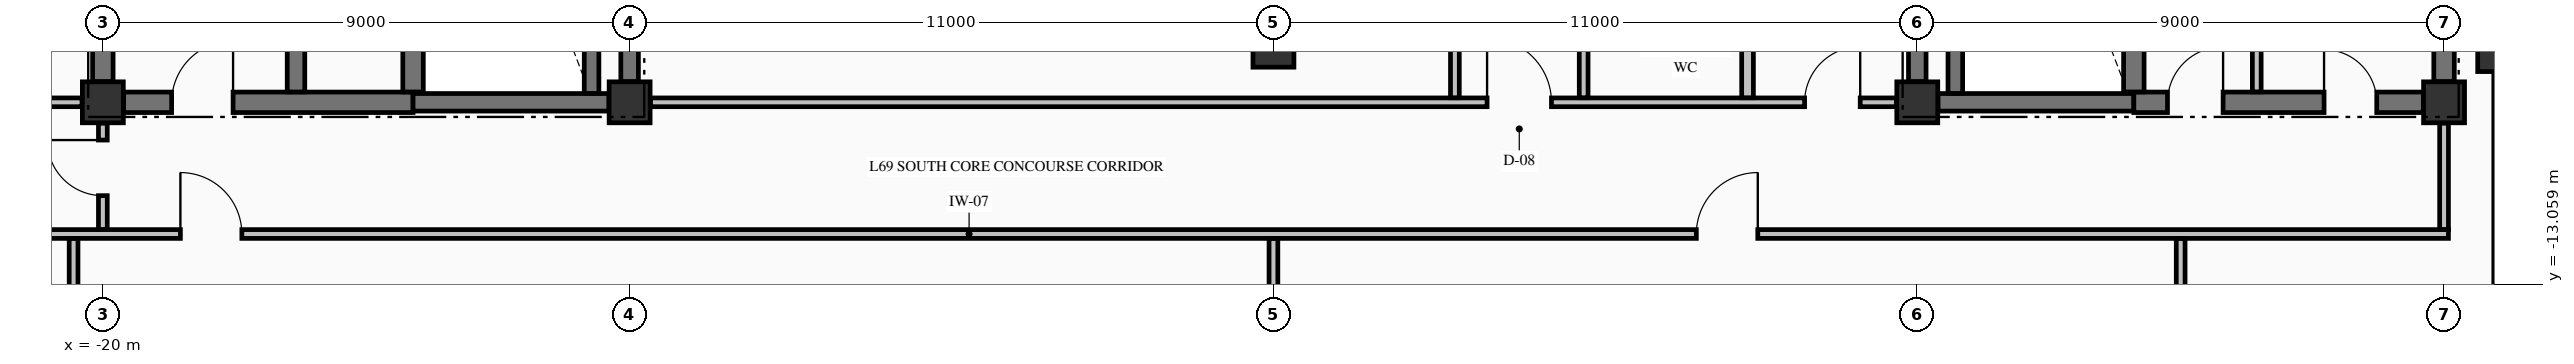
"""IFC4 building model, lengths in metres.
Left out: names, types, materials, properties, quantities, classifications, styles, units other than length and angle.
Written with IfcOpenShell. Run it as: python <this file> out.ifc"""

import sys

from ifc_helpers import new_model, si_unit, direction, frame, frame_2d, origin, origin_2d, place, context, subcontext, project, spatial, rectangle, extrude, element, fill, save


model = new_model("IFC4")
c1 = context("Model", 3, precision=1e-05, world=origin(), true_north=direction((0.0, 1.0)))
c2 = subcontext(c1, "Body", "Model", "MODEL_VIEW")
j1 = project(units=[si_unit("LENGTHUNIT", "METRE"), si_unit("PLANEANGLEUNIT", "RADIAN")], contexts=[c1])
p1 = place(None, origin())
s1 = spatial("IfcSite", under=j1, at=p1, CompositionType="ELEMENT")
p2 = place(p1, origin())
s2 = spatial("IfcBuilding", under=s1, at=p2, CompositionType="ELEMENT")
p3 = place(p2, frame((0.0, 0.0, 260.89)))
s3 = spatial("IfcBuildingStorey", under=s2, at=p3, CompositionType="ELEMENT", Elevation=260.89)
p4 = place(p3, frame((21.0, -9.0, -0.25), z_axis=(0.0, 0.0, 1.0), x_axis=(1.0, 0.0, 0.0)))
e1 = element("IfcColumn", 1, at=p4, inside=s3, PredefinedType="COLUMN", context=c2, shape_type="SweptSolid", body=[
    extrude(rectangle(XDim=0.85, YDim=0.85, at=origin_2d()), origin(), (0.0, 0.0, 1.0), 3.23),
])
for number, where, z_axis, x_axis in (
    (2, (-20.0, -9.95, -0.25), (0.0, 0.0, 1.0), (1.0, 0.0, 0.0)),
    (3, (-11.0, -9.95, -0.25), (0.0, 0.0, 1.0), (1.0, 0.0, 0.0)),
    (4, (11.0, -9.95, -0.25), (0.0, 0.0, 1.0), (1.0, 0.0, 0.0)),
    (5, (20.0, -9.95, -0.25), (0.0, 0.0, 1.0), (1.0, 0.0, 0.0)),
    (6, (0.0, -9.0, -0.25), (0.0, 0.0, 1.0), (1.0, 0.0, 0.0)),
):
    element("IfcColumn", number, at=place(p3, frame(where, z_axis=z_axis, x_axis=x_axis)), inside=s3, PredefinedType="COLUMN", context=c2, shape_type="SweptSolid", body=[
        extrude(rectangle(XDim=0.7, YDim=0.7, at=origin_2d()), origin(), (0.0, 0.0, 1.0), 3.23),
    ])
p5 = place(p3, frame((21.0, -17.545, 0.0), z_axis=(0.0, 0.0, 1.0), x_axis=(0.0, 1.0, 0.0)))
e7 = element("IfcWall", 7, at=p5, inside=s3, PredefinedType="STANDARD", context=c2, shape_type="SweptSolid", body=[
    extrude(rectangle(XDim=8.09, YDim=0.3, at=frame_2d((4.045, 0.0))), origin(), (0.0, 0.0, 1.0), 2.372),
])
p6 = place(p3, frame((-19.646, -9.95, 0.0), z_axis=(0.0, 0.0, 1.0), x_axis=(1.0, 0.0, 0.0)))
e8 = element("IfcWall", 8, at=p6, inside=s3, PredefinedType="SHEAR", context=c2, shape_type="SweptSolid", body=[
    extrude(rectangle(XDim=4.946, YDim=0.35, at=frame_2d((2.473, 0.0))), origin(), (0.0, 0.0, 1.0), 2.98),
])
p7 = place(p6, frame((0.821, 0.0, 0.0)))
e9 = element("IfcOpeningElement", 9, at=p7, cuts=e8, PredefinedType="OPENING", context=c2, shape_type="SweptSolid", body=[
    extrude(rectangle(XDim=1.05, YDim=2.15, at=frame_2d((0.525, 1.075))), frame((0.0, 0.185, 0.0), z_axis=(0.0, -1.0, 0.0), x_axis=(1.0, 0.0, 0.0)), (0.0, 0.0, 1.0), 0.37),
])
for number, where, z_axis, x_axis in (
    (10, (-14.7, -9.95, 0.0), (0.0, 0.0, 1.0), (1.0, 0.0, 0.0)),
    (11, (11.354, -9.95, 0.0), (0.0, 0.0, 1.0), (1.0, 0.0, 0.0)),
):
    element("IfcWall", number, at=place(p3, frame(where, z_axis=z_axis, x_axis=x_axis)), inside=s3, PredefinedType="SHEAR", context=c2, shape_type="SweptSolid", body=[
        extrude(rectangle(XDim=3.346, YDim=0.3, at=frame_2d((1.673, 0.0))), origin(), (0.0, 0.0, 1.0), 2.98),
    ])
p8 = place(p3, frame((14.7, -9.95, 0.0), z_axis=(0.0, 0.0, 1.0), x_axis=(1.0, 0.0, 0.0)))
e12 = element("IfcWall", 12, at=p8, inside=s3, PredefinedType="SHEAR", context=c2, shape_type="SweptSolid", body=[
    extrude(rectangle(XDim=4.946, YDim=0.35, at=frame_2d((2.473, 0.0))), origin(), (0.0, 0.0, 1.0), 2.98),
])
p9 = place(p8, frame((3.25, 0.0, 0.0)))
e13 = element("IfcOpeningElement", 13, at=p9, cuts=e12, PredefinedType="OPENING", context=c2, shape_type="SweptSolid", body=[
    extrude(rectangle(XDim=0.9, YDim=2.15, at=frame_2d((0.45, 1.075))), frame((0.0, 0.185, 0.0), z_axis=(0.0, -1.0, 0.0), x_axis=(1.0, 0.0, 0.0)), (0.0, 0.0, 1.0), 0.37),
])
p10 = place(p8, frame((0.575, 0.0, 0.0)))
e14 = element("IfcOpeningElement", 14, at=p10, cuts=e12, PredefinedType="OPENING", context=c2, shape_type="SweptSolid", body=[
    extrude(rectangle(XDim=0.95, YDim=2.15, at=frame_2d((0.475, 1.075))), frame((0.0, 0.185, 0.0), z_axis=(0.0, -1.0, 0.0), x_axis=(1.0, 0.0, 0.0)), (0.0, 0.0, 1.0), 0.37),
])
p11 = place(p3, frame((-25.835, -12.2, 0.0), z_axis=(0.0, 0.0, 1.0), x_axis=(1.0, 0.0, 0.0)))
e15 = element("IfcWall", 15, at=p11, inside=s3, PredefinedType="PARTITIONING", context=c2, shape_type="SweptSolid", body=[
    extrude(rectangle(XDim=45.91, YDim=0.15, at=frame_2d((22.955, 0.0))), origin(), (0.0, 0.0, 1.0), 2.98),
])
p12 = place(p11, frame((7.16, 0.0, 0.0)))
e16 = element("IfcOpeningElement", 16, at=p12, cuts=e15, PredefinedType="OPENING", context=c2, shape_type="SweptSolid", body=[
    extrude(rectangle(XDim=1.05, YDim=2.15, at=frame_2d((0.525, 1.075))), frame((0.0, 0.085, 0.0), z_axis=(0.0, -1.0, 0.0), x_axis=(1.0, 0.0, 0.0)), (0.0, 0.0, 1.0), 0.17),
])
p13 = place(p11, frame((33.06, 0.0, 0.0)))
e17 = element("IfcOpeningElement", 17, at=p13, cuts=e15, PredefinedType="OPENING", context=c2, shape_type="SweptSolid", body=[
    extrude(rectangle(XDim=1.05, YDim=2.15, at=frame_2d((0.525, 1.075))), frame((0.0, 0.085, 0.0), z_axis=(0.0, -1.0, 0.0), x_axis=(1.0, 0.0, 0.0)), (0.0, 0.0, 1.0), 0.17),
])
p14 = place(p3, frame((-25.835, -9.95, 0.0), z_axis=(0.0, 0.0, 1.0), x_axis=(1.0, 0.0, 0.0)))
e18 = element("IfcWall", 18, at=p14, inside=s3, PredefinedType="PARTITIONING", context=c2, shape_type="SweptSolid", body=[
    extrude(rectangle(XDim=5.479, YDim=0.15, at=frame_2d((2.74, 0.0))), origin(), (0.0, 0.0, 1.0), 2.98),
])
p15 = place(p14, frame((2.335, 0.0, 0.0)))
e19 = element("IfcOpeningElement", 19, at=p15, cuts=e18, PredefinedType="OPENING", context=c2, shape_type="SweptSolid", body=[
    extrude(rectangle(XDim=1.0, YDim=2.15, at=frame_2d((0.5, 1.075))), frame((0.0, 0.085, 0.0), z_axis=(0.0, -1.0, 0.0), x_axis=(1.0, 0.0, 0.0)), (0.0, 0.0, 1.0), 0.17),
])
p16 = place(p3, frame((-10.644, -9.95, 0.0), z_axis=(0.0, 0.0, 1.0), x_axis=(1.0, 0.0, 0.0)))
e20 = element("IfcWall", 20, at=p16, inside=s3, PredefinedType="PARTITIONING", context=c2, shape_type="SweptSolid", body=[
    extrude(rectangle(XDim=21.288, YDim=0.15, at=frame_2d((10.644, 0.0))), origin(), (0.0, 0.0, 1.0), 2.98),
])
p17 = place(p16, frame((14.294, 0.0, 0.0)))
e21 = element("IfcOpeningElement", 21, at=p17, cuts=e20, PredefinedType="OPENING", context=c2, shape_type="SweptSolid", body=[
    extrude(rectangle(XDim=1.1, YDim=2.15, at=frame_2d((0.55, 1.075))), frame((0.0, 0.085, 0.0), z_axis=(0.0, -1.0, 0.0), x_axis=(1.0, 0.0, 0.0)), (0.0, 0.0, 1.0), 0.17),
])
p18 = place(p16, frame((19.719, 0.0, 0.0)))
e22 = element("IfcOpeningElement", 22, at=p18, cuts=e20, PredefinedType="OPENING", context=c2, shape_type="SweptSolid", body=[
    extrude(rectangle(XDim=0.95, YDim=2.15, at=frame_2d((0.475, 1.075))), frame((0.0, 0.085, 0.0), z_axis=(0.0, -1.0, 0.0), x_axis=(1.0, 0.0, 0.0)), (0.0, 0.0, 1.0), 0.17),
])
p19 = place(p3, frame((-20.0, -9.596, 0.0), z_axis=(0.0, 0.0, 1.0), x_axis=(0.0, 1.0, 0.0)))
e23 = element("IfcWall", 23, at=p19, inside=s3, PredefinedType="SHEAR", context=c2, shape_type="SweptSolid", body=[
    extrude(rectangle(XDim=9.242, YDim=0.35, at=frame_2d((4.621, 0.0))), origin(), (0.0, 0.0, 1.0), 2.98),
])
p20 = place(p3, frame((-16.7, -9.773, 0.0), z_axis=(0.0, 0.0, 1.0), x_axis=(0.0, 1.0, 0.0)))
e24 = element("IfcWall", 24, at=p20, inside=s3, PredefinedType="SHEAR", context=c2, shape_type="SweptSolid", body=[
    extrude(rectangle(XDim=9.371, YDim=0.3, at=frame_2d((4.686, 0.0))), origin(), (0.0, 0.0, 1.0), 2.98),
])
p21 = place(p3, frame((-14.7, -9.773, 0.0), z_axis=(0.0, 0.0, 1.0), x_axis=(0.0, 1.0, 0.0)))
e25 = element("IfcWall", 25, at=p21, inside=s3, PredefinedType="SHEAR", context=c2, shape_type="SweptSolid", body=[
    extrude(rectangle(XDim=9.371, YDim=0.35, at=frame_2d((4.686, 0.0))), origin(), (0.0, 0.0, 1.0), 2.98),
])
p22 = place(p3, frame((-11.65, -9.798, 0.0), z_axis=(0.0, 0.0, 1.0), x_axis=(0.0, 1.0, 0.0)))
e26 = element("IfcWall", 26, at=p22, inside=s3, PredefinedType="SOLIDWALL", context=c2, shape_type="SweptSolid", body=[
    extrude(rectangle(XDim=9.396, YDim=0.25, at=frame_2d((4.698, 0.0))), origin(), (0.0, 0.0, 1.0), 2.98),
])
for number, where, z_axis, x_axis in (
    (27, (-11.0, -9.596, 0.0), (0.0, 0.0, 1.0), (0.0, 1.0, 0.0)),
    (28, (11.0, -9.596, 0.0), (0.0, 0.0, 1.0), (0.0, 1.0, 0.0)),
):
    element("IfcWall", number, at=place(p3, frame(where, z_axis=z_axis, x_axis=x_axis)), inside=s3, PredefinedType="SHEAR", context=c2, shape_type="SweptSolid", body=[
        extrude(rectangle(XDim=9.242, YDim=0.3, at=frame_2d((4.621, 0.0))), origin(), (0.0, 0.0, 1.0), 2.98),
    ])
p23 = place(p3, frame((11.65, -9.798, 0.0), z_axis=(0.0, 0.0, 1.0), x_axis=(0.0, 1.0, 0.0)))
e29 = element("IfcWall", 29, at=p23, inside=s3, PredefinedType="SOLIDWALL", context=c2, shape_type="SweptSolid", body=[
    extrude(rectangle(XDim=9.396, YDim=0.25, at=frame_2d((4.698, 0.0))), origin(), (0.0, 0.0, 1.0), 2.98),
])
p24 = place(p3, frame((14.7, -9.773, 0.0), z_axis=(0.0, 0.0, 1.0), x_axis=(0.0, 1.0, 0.0)))
e30 = element("IfcWall", 30, at=p24, inside=s3, PredefinedType="SHEAR", context=c2, shape_type="SweptSolid", body=[
    extrude(rectangle(XDim=9.371, YDim=0.35, at=frame_2d((4.686, 0.0))), origin(), (0.0, 0.0, 1.0), 2.98),
])
p25 = place(p3, frame((20.0, -9.596, 0.0), z_axis=(0.0, 0.0, 1.0), x_axis=(0.0, 1.0, 0.0)))
e31 = element("IfcWall", 31, at=p25, inside=s3, PredefinedType="SHEAR", context=c2, shape_type="SweptSolid", body=[
    extrude(rectangle(XDim=14.769, YDim=0.35, at=frame_2d((7.385, 0.0))), origin(), (0.0, 0.0, 1.0), 2.98),
])
p26 = place(p3, frame((-20.5, -17.569, 0.0), z_axis=(0.0, 0.0, 1.0), x_axis=(0.0, 1.0, 0.0)))
e32 = element("IfcWall", 32, at=p26, inside=s3, PredefinedType="PARTITIONING", context=c2, shape_type="SweptSolid", body=[
    extrude(rectangle(XDim=5.291, YDim=0.15, at=frame_2d((2.646, 0.0))), origin(), (0.0, 0.0, 1.0), 2.98),
])
p27 = place(p3, frame((-20.0, -12.122, 0.0), z_axis=(0.0, 0.0, 1.0), x_axis=(0.0, 1.0, 0.0)))
e33 = element("IfcWall", 33, at=p27, inside=s3, PredefinedType="PARTITIONING", context=c2, shape_type="SweptSolid", body=[
    extrude(rectangle(XDim=1.816, YDim=0.15, at=frame_2d((0.908, 0.0))), origin(), (0.0, 0.0, 1.0), 2.98),
])
p28 = place(p27, frame((0.577, 0.0, 0.0)))
e34 = element("IfcOpeningElement", 34, at=p28, cuts=e33, PredefinedType="OPENING", context=c2, shape_type="SweptSolid", body=[
    extrude(rectangle(XDim=0.95, YDim=2.15, at=frame_2d((0.475, 1.075))), frame((0.0, 0.085, 0.0), z_axis=(0.0, -1.0, 0.0), x_axis=(1.0, 0.0, 0.0)), (0.0, 0.0, 1.0), 0.17),
])
p29 = place(p3, frame((0.0, -23.069, 0.0), z_axis=(0.0, 0.0, 1.0), x_axis=(0.0, 1.0, 0.0)))
e35 = element("IfcWall", 35, at=p29, inside=s3, PredefinedType="PARTITIONING", context=c2, shape_type="SweptSolid", body=[
    extrude(rectangle(XDim=10.791, YDim=0.15, at=frame_2d((5.396, 0.0))), origin(), (0.0, 0.0, 1.0), 2.57),
])
p30 = place(p3, frame((3.1, -9.872, 0.0), z_axis=(0.0, 0.0, 1.0), x_axis=(0.0, 1.0, 0.0)))
e36 = element("IfcWall", 36, at=p30, inside=s3, PredefinedType="PARTITIONING", context=c2, shape_type="SweptSolid", body=[
    extrude(rectangle(XDim=9.544, YDim=0.15, at=frame_2d((4.772, 0.0))), origin(), (0.0, 0.0, 1.0), 2.98),
])
p31 = place(p3, frame((5.3, -9.872, 0.0), z_axis=(0.0, 0.0, 1.0), x_axis=(0.0, 1.0, 0.0)))
e37 = element("IfcWall", 37, at=p31, inside=s3, PredefinedType="PARTITIONING", context=c2, shape_type="SweptSolid", body=[
    extrude(rectangle(XDim=4.919, YDim=0.15, at=frame_2d((2.459, 0.0))), origin(), (0.0, 0.0, 1.0), 2.98),
])
p32 = place(p31, frame((1.997, 0.0, 0.0)))
e38 = element("IfcOpeningElement", 38, at=p32, cuts=e37, PredefinedType="OPENING", context=c2, shape_type="SweptSolid", body=[
    extrude(rectangle(XDim=0.95, YDim=2.15, at=frame_2d((0.475, 1.075))), frame((0.0, 0.085, 0.0), z_axis=(0.0, -1.0, 0.0), x_axis=(1.0, 0.0, 0.0)), (0.0, 0.0, 1.0), 0.17),
])
p33 = place(p3, frame((8.1, -9.872, 0.0), z_axis=(0.0, 0.0, 1.0), x_axis=(0.0, 1.0, 0.0)))
e39 = element("IfcWall", 39, at=p33, inside=s3, PredefinedType="PARTITIONING", context=c2, shape_type="SweptSolid", body=[
    extrude(rectangle(XDim=4.919, YDim=0.2, at=frame_2d((2.459, 0.0))), origin(), (0.0, 0.0, 1.0), 2.98),
])
p34 = place(p3, frame((15.5, -17.569, 0.0), z_axis=(0.0, 0.0, 1.0), x_axis=(0.0, 1.0, 0.0)))
e40 = element("IfcWall", 40, at=p34, inside=s3, PredefinedType="PARTITIONING", context=c2, shape_type="SweptSolid", body=[
    extrude(rectangle(XDim=5.291, YDim=0.15, at=frame_2d((2.646, 0.0))), origin(), (0.0, 0.0, 1.0), 2.98),
])
p35 = place(p3, frame((16.8, -9.772, 0.0), z_axis=(0.0, 0.0, 1.0), x_axis=(0.0, 1.0, 0.0)))
e41 = element("IfcWall", 41, at=p35, inside=s3, PredefinedType="PARTITIONING", context=c2, shape_type="SweptSolid", body=[
    extrude(rectangle(XDim=7.194, YDim=0.15, at=frame_2d((3.597, 0.0))), origin(), (0.0, 0.0, 1.0), 2.98),
])
p36 = place(p3, frame((20.0, -12.122, 0.0), z_axis=(0.0, 0.0, 1.0), x_axis=(0.0, 1.0, 0.0)))
e42 = element("IfcWall", 42, at=p36, inside=s3, PredefinedType="PARTITIONING", context=c2, shape_type="SweptSolid", body=[
    extrude(rectangle(XDim=1.816, YDim=0.15, at=frame_2d((0.908, 0.0))), origin(), (0.0, 0.0, 1.0), 2.57),
])
p37 = place(p7, origin())
e43 = element("IfcDoor", 43, at=p37, inside=s3, OperationType="SINGLE_SWING_RIGHT", PredefinedType="DOOR", context=c2, shape_type="SweptSolid", body=[
    extrude(rectangle(XDim=1.05, YDim=2.15, at=frame_2d((0.525, 1.075))), frame((0.0, 0.025, 0.0), z_axis=(0.0, -1.0, 0.0), x_axis=(1.0, 0.0, 0.0)), (0.0, 0.0, 1.0), 0.05),
])
fill(e9, e43)
p38 = place(p9, origin())
e44 = element("IfcDoor", 44, at=p38, inside=s3, OperationType="SINGLE_SWING_LEFT", PredefinedType="DOOR", context=c2, shape_type="SweptSolid", body=[
    extrude(rectangle(XDim=0.9, YDim=2.15, at=frame_2d((0.45, 1.075))), frame((0.0, 0.025, 0.0), z_axis=(0.0, -1.0, 0.0), x_axis=(1.0, 0.0, 0.0)), (0.0, 0.0, 1.0), 0.05),
])
fill(e13, e44)
p39 = place(p10, origin())
e45 = element("IfcDoor", 45, at=p39, inside=s3, OperationType="SINGLE_SWING_RIGHT", PredefinedType="DOOR", context=c2, shape_type="SweptSolid", body=[
    extrude(rectangle(XDim=0.95, YDim=2.15, at=frame_2d((0.475, 1.075))), frame((0.0, 0.025, 0.0), z_axis=(0.0, -1.0, 0.0), x_axis=(1.0, 0.0, 0.0)), (0.0, 0.0, 1.0), 0.05),
])
fill(e14, e45)
p40 = place(p17, origin())
e46 = element("IfcDoor", 46, at=p40, inside=s3, OperationType="SINGLE_SWING_LEFT", PredefinedType="DOOR", context=c2, shape_type="SweptSolid", body=[
    extrude(rectangle(XDim=1.1, YDim=2.15, at=frame_2d((0.55, 1.075))), frame((0.0, 0.025, 0.0), z_axis=(0.0, -1.0, 0.0), x_axis=(1.0, 0.0, 0.0)), (0.0, 0.0, 1.0), 0.05),
])
fill(e21, e46)
p41 = place(p12, origin())
e47 = element("IfcDoor", 47, at=p41, inside=s3, OperationType="SINGLE_SWING_LEFT", PredefinedType="DOOR", context=c2, shape_type="SweptSolid", body=[
    extrude(rectangle(XDim=1.05, YDim=2.15, at=frame_2d((0.525, 1.075))), frame((0.0, 0.025, 0.0), z_axis=(0.0, -1.0, 0.0), x_axis=(1.0, 0.0, 0.0)), (0.0, 0.0, 1.0), 0.05),
])
fill(e16, e47)
p42 = place(p13, origin())
e48 = element("IfcDoor", 48, at=p42, inside=s3, OperationType="SINGLE_SWING_RIGHT", PredefinedType="DOOR", context=c2, shape_type="SweptSolid", body=[
    extrude(rectangle(XDim=1.05, YDim=2.15, at=frame_2d((0.525, 1.075))), frame((0.0, 0.025, 0.0), z_axis=(0.0, -1.0, 0.0), x_axis=(1.0, 0.0, 0.0)), (0.0, 0.0, 1.0), 0.05),
])
fill(e17, e48)
p43 = place(p18, origin())
e49 = element("IfcDoor", 49, at=p43, inside=s3, OperationType="SINGLE_SWING_RIGHT", PredefinedType="DOOR", context=c2, shape_type="SweptSolid", body=[
    extrude(rectangle(XDim=0.95, YDim=2.15, at=frame_2d((0.475, 1.075))), frame((0.0, 0.025, 0.0), z_axis=(0.0, -1.0, 0.0), x_axis=(1.0, 0.0, 0.0)), (0.0, 0.0, 1.0), 0.05),
])
fill(e22, e49)
p44 = place(p28, origin())
e50 = element("IfcDoor", 50, at=p44, inside=s3, OperationType="SINGLE_SWING_RIGHT", PredefinedType="DOOR", context=c2, shape_type="SweptSolid", body=[
    extrude(rectangle(XDim=0.95, YDim=2.15, at=frame_2d((0.475, 1.075))), frame((0.0, 0.025, 0.0), z_axis=(0.0, -1.0, 0.0), x_axis=(1.0, 0.0, 0.0)), (0.0, 0.0, 1.0), 0.05),
])
fill(e34, e50)
save(model, sys.argv[1])
